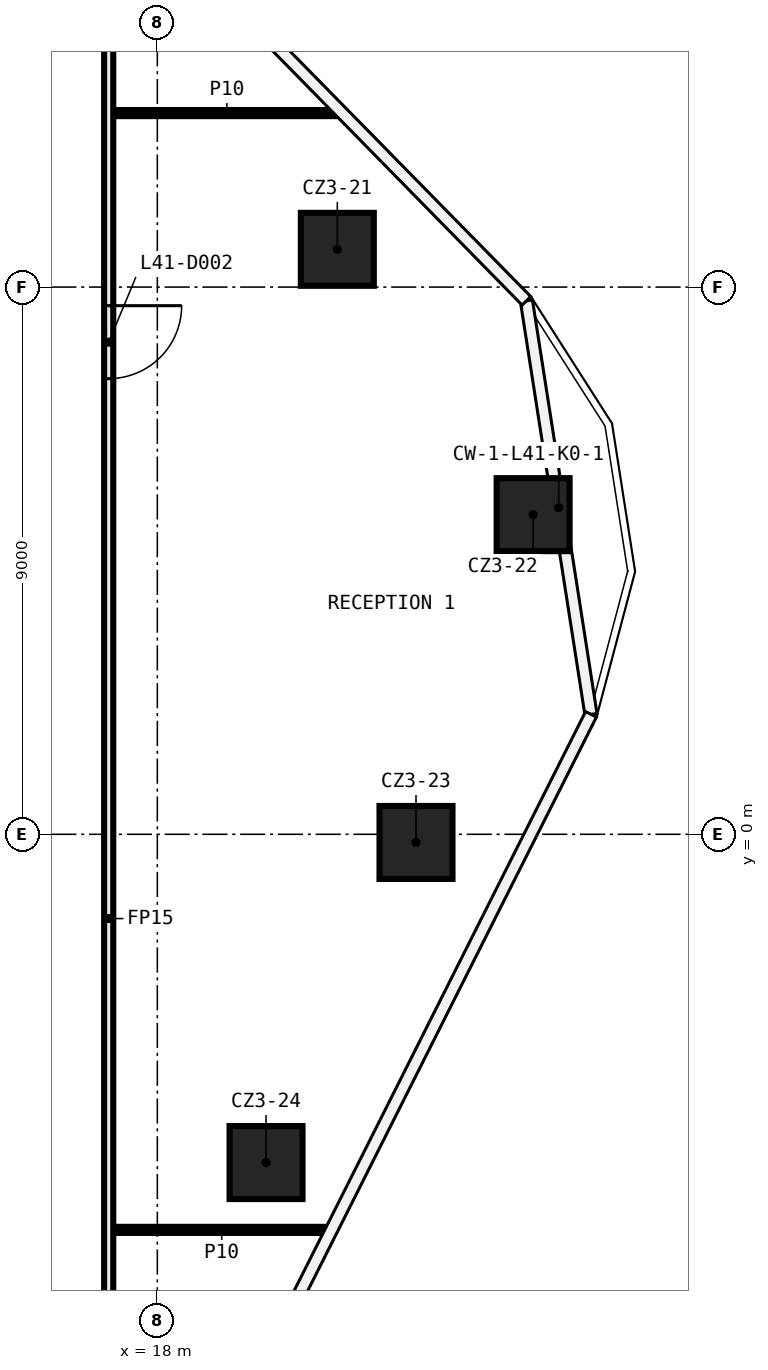
"""IFC4 building model, lengths in metres.
Left out: names, types, materials, properties, quantities, classifications, styles, units other than length and angle.
Written with IfcOpenShell. Run it as: python <this file> out.ifc"""

import sys

from ifc_helpers import new_model, si_unit, direction, frame, frame_2d, origin, origin_2d, place, context, subcontext, project, spatial, rectangle, extrude, element, fill, save


model = new_model("IFC4")
c1 = context("Model", 3, precision=1e-05, world=origin(), true_north=direction((0.0, 1.0)))
c2 = subcontext(c1, "Body", "Model", "MODEL_VIEW")
j1 = project(units=[si_unit("LENGTHUNIT", "METRE"), si_unit("PLANEANGLEUNIT", "RADIAN")], contexts=[c1])
p1 = place(None, origin())
s1 = spatial("IfcSite", under=j1, at=p1, CompositionType="ELEMENT")
p2 = place(p1, origin())
s2 = spatial("IfcBuilding", under=s1, at=p2, CompositionType="ELEMENT")
p3 = place(p2, frame((0.0, 0.0, 198.8)))
s3 = spatial("IfcBuildingStorey", under=s2, at=p3, CompositionType="ELEMENT", Elevation=198.8)
for number, where, z_axis, x_axis in (
    (1, (20.96, 9.621, 0.0), (0.0, 0.0, 1.0), (1.0, 0.0, 0.0)),
    (2, (24.18, 5.257, 0.0), (0.0, 0.0, 1.0), (1.0, 0.0, 0.0)),
    (3, (22.254, -0.134, 0.0), (0.0, 0.0, 1.0), (1.0, 0.0, 0.0)),
    (4, (19.788, -5.399, 0.0), (0.0, 0.0, 1.0), (1.0, 0.0, 0.0)),
):
    element("IfcColumn", number, at=place(p3, frame(where, z_axis=z_axis, x_axis=x_axis)), inside=s3, PredefinedType="COLUMN", context=c2, shape_type="SweptSolid", body=[
        extrude(rectangle(XDim=1.2, YDim=1.2, at=origin_2d()), origin(), (0.0, 0.0, 1.0), 3.82),
    ])
p4 = place(p3, frame((17.275, -6.506, 0.0), z_axis=(0.0, 0.0, 1.0), x_axis=(1.0, 0.0, 0.0)))
e5 = element("IfcWall", 5, at=p4, inside=s3, PredefinedType="PARTITIONING", context=c2, shape_type="SweptSolid", body=[
    extrude(rectangle(XDim=3.568, YDim=0.1, at=frame_2d((1.784, 0.0))), origin(), (0.0, 0.0, 1.0), 3.82),
])
p5 = place(p3, frame((17.275, 11.862, 0.0), z_axis=(0.0, 0.0, 1.0), x_axis=(1.0, 0.0, 0.0)))
e6 = element("IfcWall", 6, at=p5, inside=s3, PredefinedType="PARTITIONING", context=c2, shape_type="SweptSolid", body=[
    extrude(rectangle(XDim=3.737, YDim=0.1, at=frame_2d((1.868, 0.0))), origin(), (0.0, 0.0, 1.0), 3.82),
])
p6 = place(p3, frame((17.2, 13.106, 0.0), z_axis=(0.0, 0.0, 1.0), x_axis=(0.0, -1.0, 0.0)))
e7 = element("IfcWall", 7, at=p6, inside=s3, PredefinedType="PARTITIONING", context=c2, shape_type="SweptSolid", body=[
    extrude(rectangle(XDim=23.172, YDim=0.15, at=frame_2d((11.586, 0.0))), origin(), (0.0, 0.0, 1.0), 3.82),
])
p7 = place(p6, frame((4.412, 0.0, 0.0)))
e8 = element("IfcOpeningElement", 8, at=p7, cuts=e7, PredefinedType="OPENING", context=c2, shape_type="SweptSolid", body=[
    extrude(rectangle(XDim=1.2, YDim=2.1, at=frame_2d((0.6, 1.05))), frame((0.0, 0.085, 0.0), z_axis=(0.0, -1.0, 0.0), x_axis=(1.0, 0.0, 0.0)), (0.0, 0.0, 1.0), 0.17),
])
p8 = place(p7, origin())
e9 = element("IfcDoor", 9, at=p8, inside=s3, OperationType="SINGLE_SWING_LEFT", PredefinedType="DOOR", context=c2, shape_type="SweptSolid", body=[
    extrude(rectangle(XDim=1.2, YDim=2.1, at=frame_2d((0.6, 1.05))), frame((0.0, 0.025, 0.0), z_axis=(0.0, -1.0, 0.0), x_axis=(1.0, 0.0, 0.0)), (0.0, 0.0, 1.0), 0.05),
])
fill(e8, e9)
save(model, sys.argv[1])
